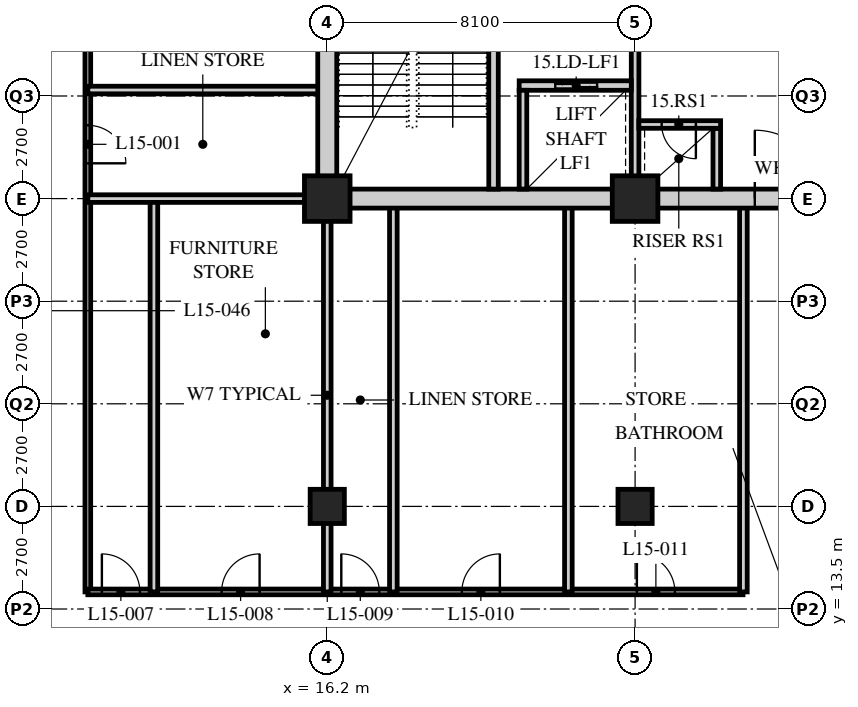
"""IFC4 building model, lengths in metres.
Left out: names, types, materials, properties, quantities, classifications, styles, units other than length and angle.
Written with IfcOpenShell. Run it as: python <this file> out.ifc"""

import sys

from ifc_helpers import new_model, si_unit, direction, frame, frame_2d, origin, origin_2d, place, context, subcontext, project, spatial, rectangle, hollow_rectangle, extrude, element, fill, save


model = new_model("IFC4")
c1 = context("Model", 3, precision=1e-05, world=origin(), true_north=direction((0.0, 1.0)))
c2 = subcontext(c1, "Body", "Model", "MODEL_VIEW")
j1 = project(units=[si_unit("LENGTHUNIT", "METRE"), si_unit("PLANEANGLEUNIT", "RADIAN")], contexts=[c1])
p1 = place(None, origin())
s1 = spatial("IfcSite", under=j1, at=p1, CompositionType="ELEMENT")
p2 = place(p1, origin())
s2 = spatial("IfcBuilding", under=s1, at=p2, CompositionType="ELEMENT")
p3 = place(p2, frame((0.0, 0.0, 63.6)))
s3 = spatial("IfcBuildingStorey", under=s2, at=p3, CompositionType="ELEMENT", Elevation=63.6)
p4 = place(p3, frame((16.2, 16.2, 0.0), z_axis=(0.0, 0.0, 1.0), x_axis=(1.0, 0.0, 0.0)))
e1 = element("IfcColumn", 1, at=p4, inside=s3, PredefinedType="COLUMN", context=c2, shape_type="SweptSolid", body=[
    extrude(hollow_rectangle(XDim=0.9, YDim=0.9, WallThickness=0.09, at=origin_2d()), origin(), (0.0, 0.0, 1.0), 3.4),
])
p5 = place(p3, frame((16.2, 24.3, 0.0), z_axis=(0.0, 0.0, 1.0), x_axis=(1.0, 0.0, 0.0)))
e2 = element("IfcColumn", 2, at=p5, inside=s3, PredefinedType="COLUMN", context=c2, shape_type="SweptSolid", body=[
    extrude(hollow_rectangle(XDim=1.2, YDim=1.2, WallThickness=0.12, at=origin_2d()), origin(), (0.0, 0.0, 1.0), 3.4),
])
p6 = place(p3, frame((24.3, 16.2, 0.0), z_axis=(0.0, 0.0, 1.0), x_axis=(1.0, 0.0, 0.0)))
e3 = element("IfcColumn", 3, at=p6, inside=s3, PredefinedType="COLUMN", context=c2, shape_type="SweptSolid", body=[
    extrude(hollow_rectangle(XDim=0.9, YDim=0.9, WallThickness=0.09, at=origin_2d()), origin(), (0.0, 0.0, 1.0), 3.4),
])
p7 = place(p3, frame((24.3, 24.3, 0.0), z_axis=(0.0, 0.0, 1.0), x_axis=(1.0, 0.0, 0.0)))
e4 = element("IfcColumn", 4, at=p7, inside=s3, PredefinedType="COLUMN", context=c2, shape_type="SweptSolid", body=[
    extrude(hollow_rectangle(XDim=1.2, YDim=1.2, WallThickness=0.12, at=origin_2d()), origin(), (0.0, 0.0, 1.0), 3.4),
])
p8 = place(p3, frame((9.9, 40.5, 0.0), z_axis=(0.0, 0.0, 1.0), x_axis=(0.0, -1.0, 0.0)))
e5 = element("IfcWall", 5, at=p8, inside=s3, PredefinedType="PARTITIONING", context=c2, shape_type="SweptSolid", body=[
    extrude(rectangle(XDim=26.55, YDim=0.15, at=frame_2d((13.275, 0.0))), origin(), (0.0, 0.0, 1.0), 3.19),
])
p9 = place(p8, frame((14.271, 0.0, 0.0)))
e6 = element("IfcOpeningElement", 6, at=p9, cuts=e5, PredefinedType="OPENING", context=c2, shape_type="SweptSolid", body=[
    extrude(rectangle(XDim=1.0, YDim=2.1, at=frame_2d((0.5, 1.05))), frame((0.0, 0.085, 0.0), z_axis=(0.0, -1.0, 0.0), x_axis=(1.0, 0.0, 0.0)), (0.0, 0.0, 1.0), 0.17),
])
p10 = place(p8, frame((10.221, 0.0, 0.0)))
e7 = element("IfcOpeningElement", 7, at=p10, cuts=e5, PredefinedType="OPENING", context=c2, shape_type="SweptSolid", body=[
    extrude(rectangle(XDim=1.0, YDim=2.1, at=frame_2d((0.5, 1.05))), frame((0.0, 0.085, 0.0), z_axis=(0.0, -1.0, 0.0), x_axis=(1.0, 0.0, 0.0)), (0.0, 0.0, 1.0), 0.17),
])
p11 = place(p8, frame((6.8, 0.0, 0.0)))
e8 = element("IfcOpeningElement", 8, at=p11, cuts=e5, PredefinedType="OPENING", context=c2, shape_type="SweptSolid", body=[
    extrude(rectangle(XDim=1.0, YDim=2.1, at=frame_2d((0.5, 1.05))), frame((0.0, 0.085, 0.0), z_axis=(0.0, -1.0, 0.0), x_axis=(1.0, 0.0, 0.0)), (0.0, 0.0, 1.0), 0.17),
])
p12 = place(p8, frame((2.75, 0.0, 0.0)))
e9 = element("IfcOpeningElement", 9, at=p12, cuts=e5, PredefinedType="OPENING", context=c2, shape_type="SweptSolid", body=[
    extrude(rectangle(XDim=1.0, YDim=2.1, at=frame_2d((0.5, 1.05))), frame((0.0, 0.085, 0.0), z_axis=(0.0, -1.0, 0.0), x_axis=(1.0, 0.0, 0.0)), (0.0, 0.0, 1.0), 0.17),
])
p13 = place(p3, frame((9.9, 13.95, 0.0), z_axis=(0.0, 0.0, 1.0), x_axis=(1.0, 0.0, 0.0)))
e10 = element("IfcWall", 10, at=p13, inside=s3, PredefinedType="PARTITIONING", context=c2, shape_type="SweptSolid", body=[
    extrude(rectangle(XDim=17.24, YDim=0.15, at=frame_2d((8.62, 0.0))), origin(), (0.0, 0.0, 1.0), 3.19),
])
p14 = place(p13, frame((0.37, 0.0, 0.0)))
e11 = element("IfcOpeningElement", 11, at=p14, cuts=e10, PredefinedType="OPENING", context=c2, shape_type="SweptSolid", body=[
    extrude(rectangle(XDim=1.0, YDim=2.1, at=frame_2d((0.5, 1.05))), frame((0.0, 0.085, 0.0), z_axis=(0.0, -1.0, 0.0), x_axis=(1.0, 0.0, 0.0)), (0.0, 0.0, 1.0), 0.17),
])
p15 = place(p13, frame((3.52, 0.0, 0.0)))
e12 = element("IfcOpeningElement", 12, at=p15, cuts=e10, PredefinedType="OPENING", context=c2, shape_type="SweptSolid", body=[
    extrude(rectangle(XDim=1.0, YDim=2.1, at=frame_2d((0.5, 1.05))), frame((0.0, 0.085, 0.0), z_axis=(0.0, -1.0, 0.0), x_axis=(1.0, 0.0, 0.0)), (0.0, 0.0, 1.0), 0.17),
])
p16 = place(p13, frame((6.67, 0.0, 0.0)))
e13 = element("IfcOpeningElement", 13, at=p16, cuts=e10, PredefinedType="OPENING", context=c2, shape_type="SweptSolid", body=[
    extrude(rectangle(XDim=1.0, YDim=2.1, at=frame_2d((0.5, 1.05))), frame((0.0, 0.085, 0.0), z_axis=(0.0, -1.0, 0.0), x_axis=(1.0, 0.0, 0.0)), (0.0, 0.0, 1.0), 0.17),
])
p17 = place(p13, frame((9.842, 0.0, 0.0)))
e14 = element("IfcOpeningElement", 14, at=p17, cuts=e10, PredefinedType="OPENING", context=c2, shape_type="SweptSolid", body=[
    extrude(rectangle(XDim=1.0, YDim=2.1, at=frame_2d((0.5, 1.05))), frame((0.0, 0.085, 0.0), z_axis=(0.0, -1.0, 0.0), x_axis=(1.0, 0.0, 0.0)), (0.0, 0.0, 1.0), 0.17),
])
p18 = place(p13, frame((14.447, 0.0, 0.0)))
e15 = element("IfcOpeningElement", 15, at=p18, cuts=e10, PredefinedType="OPENING", context=c2, shape_type="SweptSolid", body=[
    extrude(rectangle(XDim=1.0, YDim=2.1, at=frame_2d((0.5, 1.05))), frame((0.0, 0.085, 0.0), z_axis=(0.0, -1.0, 0.0), x_axis=(1.0, 0.0, 0.0)), (0.0, 0.0, 1.0), 0.17),
])
p19 = place(p3, frame((9.9, 27.157, 0.0), z_axis=(0.0, 0.0, 1.0), x_axis=(1.0, 0.0, 0.0)))
e16 = element("IfcWall", 16, at=p19, inside=s3, PredefinedType="SOLIDWALL", context=c2, shape_type="SweptSolid", body=[
    extrude(rectangle(XDim=6.3, YDim=0.2, at=frame_2d((3.15, 0.0))), origin(), (0.0, 0.0, 1.0), 3.19),
])
p20 = place(p3, frame((16.2, 13.95, 0.0), z_axis=(0.0, 0.0, 1.0), x_axis=(0.0, 1.0, 0.0)))
e17 = element("IfcWall", 17, at=p20, inside=s3, PredefinedType="SOLIDWALL", context=c2, shape_type="SweptSolid", body=[
    extrude(rectangle(XDim=10.35, YDim=0.2, at=frame_2d((5.175, 0.0))), origin(), (0.0, 0.0, 1.0), 2.578),
])
for number, where, z_axis, x_axis in (
    (18, (11.639, 13.95, 0.0), (0.0, 0.0, 1.0), (0.0, 1.0, 0.0)),
    (19, (17.939, 13.95, 0.0), (0.0, 0.0, 1.0), (0.0, 1.0, 0.0)),
    (20, (22.545, 13.95, 0.0), (0.0, 0.0, 1.0), (0.0, 1.0, 0.0)),
    (21, (27.15, 13.95, 0.0), (0.0, 0.0, 1.0), (0.0, 1.0, 0.0)),
):
    element("IfcWall", number, at=place(p3, frame(where, z_axis=z_axis, x_axis=x_axis)), inside=s3, PredefinedType="SOLIDWALL", context=c2, shape_type="SweptSolid", body=[
        extrude(rectangle(XDim=10.35, YDim=0.2, at=frame_2d((5.175, 0.0))), origin(), (0.0, 0.0, 1.0), 3.19),
    ])
p21 = place(p3, frame((9.9, 24.3, 0.0), z_axis=(0.0, 0.0, 1.0), x_axis=(1.0, 0.0, 0.0)))
e22 = element("IfcWall", 22, at=p21, inside=s3, PredefinedType="SOLIDWALL", context=c2, shape_type="SweptSolid", body=[
    extrude(rectangle(XDim=6.3, YDim=0.2, at=frame_2d((3.15, 0.0))), origin(), (0.0, 0.0, 1.0), 2.578),
])
p22 = place(p3, frame((15.95, 24.3, 0.0), z_axis=(0.0, 0.0, 1.0), x_axis=(1.0, 0.0, 0.0)))
e23 = element("IfcWall", 23, at=p22, inside=s3, PredefinedType="SOLIDWALL", context=c2, shape_type="SweptSolid", body=[
    extrude(rectangle(XDim=24.8, YDim=0.5, at=frame_2d((12.4, 0.0))), origin(), (0.0, 0.0, 1.0), 2.54),
])
p23 = place(p22, frame((11.5, 0.0, 0.0)))
e24 = element("IfcOpeningElement", 24, at=p23, cuts=e23, PredefinedType="OPENING", context=c2, shape_type="SweptSolid", body=[
    extrude(rectangle(XDim=1.8, YDim=2.4, at=frame_2d((0.9, 1.2))), frame((0.0, 0.26, 0.0), z_axis=(0.0, -1.0, 0.0), x_axis=(1.0, 0.0, 0.0)), (0.0, 0.0, 1.0), 0.52),
])
p24 = place(p3, frame((16.2, 24.55, 0.0), z_axis=(0.0, 0.0, 1.0), x_axis=(0.0, 1.0, 0.0)))
e25 = element("IfcWall", 25, at=p24, inside=s3, PredefinedType="SOLIDWALL", context=c2, shape_type="SweptSolid", body=[
    extrude(rectangle(XDim=15.7, YDim=0.5, at=frame_2d((7.85, 0.0))), origin(), (0.0, 0.0, 1.0), 2.578),
])
p25 = place(p3, frame((24.3, 24.55, 0.0), z_axis=(0.0, 0.0, 1.0), x_axis=(0.0, 1.0, 0.0)))
e26 = element("IfcWall", 26, at=p25, inside=s3, PredefinedType="SOLIDWALL", context=c2, shape_type="SweptSolid", body=[
    extrude(rectangle(XDim=7.75, YDim=0.2, at=frame_2d((3.875, 0.0))), origin(), (0.0, 0.0, 1.0), 2.578),
])
p26 = place(p25, frame((4.6, 0.0, 0.0)))
e27 = element("IfcOpeningElement", 27, at=p26, cuts=e26, PredefinedType="OPENING", context=c2, shape_type="SweptSolid", body=[
    extrude(rectangle(XDim=1.2, YDim=2.1, at=frame_2d((0.6, 1.05))), frame((0.0, 0.11, 0.0), z_axis=(0.0, -1.0, 0.0), x_axis=(1.0, 0.0, 0.0)), (0.0, 0.0, 1.0), 0.22),
])
p27 = place(p3, frame((20.575, 24.55, 0.0), z_axis=(0.0, 0.0, 1.0), x_axis=(0.0, 1.0, 0.0)))
e28 = element("IfcWall", 28, at=p27, inside=s3, PredefinedType="SOLIDWALL", context=c2, shape_type="SweptSolid", body=[
    extrude(rectangle(XDim=7.75, YDim=0.25, at=frame_2d((3.875, 0.0))), origin(), (0.0, 0.0, 1.0), 3.19),
])
p28 = place(p27, frame((6.2, 0.0, 0.0)))
e29 = element("IfcOpeningElement", 29, at=p28, cuts=e28, PredefinedType="OPENING", context=c2, shape_type="SweptSolid", body=[
    extrude(rectangle(XDim=1.2, YDim=2.1, at=frame_2d((0.6, 1.05))), frame((0.0, 0.135, 0.0), z_axis=(0.0, -1.0, 0.0), x_axis=(1.0, 0.0, 0.0)), (0.0, 0.0, 1.0), 0.27),
])
p29 = place(p3, frame((21.25, 27.275, 0.0), z_axis=(0.0, 0.0, 1.0), x_axis=(1.0, 0.0, 0.0)))
e30 = element("IfcWall", 30, at=p29, inside=s3, PredefinedType="SOLIDWALL", context=c2, shape_type="SweptSolid", body=[
    extrude(rectangle(XDim=2.95, YDim=0.25, at=frame_2d((1.475, 0.0))), origin(), (0.0, 0.0, 1.0), 3.19),
])
p30 = place(p29, frame((0.95, 0.0, 0.0)))
e31 = element("IfcOpeningElement", 31, at=p30, cuts=e30, PredefinedType="OPENING", context=c2, shape_type="SweptSolid", body=[
    extrude(rectangle(XDim=1.1, YDim=2.4, at=frame_2d((0.55, 1.2))), frame((0.0, 0.135, 0.0), z_axis=(0.0, -1.0, 0.0), x_axis=(1.0, 0.0, 0.0)), (0.0, 0.0, 1.0), 0.27),
])
p31 = place(p3, frame((21.35, 24.55, 0.0), z_axis=(0.0, 0.0, 1.0), x_axis=(0.0, 1.0, 0.0)))
e32 = element("IfcWall", 32, at=p31, inside=s3, PredefinedType="SOLIDWALL", context=c2, shape_type="SweptSolid", body=[
    extrude(rectangle(XDim=2.6, YDim=0.2, at=frame_2d((1.3, 0.0))), origin(), (0.0, 0.0, 1.0), 3.19),
])
p32 = place(p3, frame((26.45, 24.55, 0.0), z_axis=(0.0, 0.0, 1.0), x_axis=(0.0, 1.0, 0.0)))
e33 = element("IfcWall", 33, at=p32, inside=s3, PredefinedType="SOLIDWALL", context=c2, shape_type="SweptSolid", body=[
    extrude(rectangle(XDim=1.6, YDim=0.2, at=frame_2d((0.8, 0.0))), origin(), (0.0, 0.0, 1.0), 3.19),
])
p33 = place(p3, frame((24.4, 26.25, 0.0), z_axis=(0.0, 0.0, 1.0), x_axis=(1.0, 0.0, 0.0)))
e34 = element("IfcWall", 34, at=p33, inside=s3, PredefinedType="SOLIDWALL", context=c2, shape_type="SweptSolid", body=[
    extrude(rectangle(XDim=2.15, YDim=0.2, at=frame_2d((1.075, 0.0))), origin(), (0.0, 0.0, 1.0), 3.19),
])
p34 = place(p33, frame((0.6, 0.0, 0.0)))
e35 = element("IfcOpeningElement", 35, at=p34, cuts=e34, PredefinedType="OPENING", context=c2, shape_type="SweptSolid", body=[
    extrude(rectangle(XDim=0.9, YDim=2.1, at=frame_2d((0.45, 1.05))), frame((0.0, 0.11, 0.0), z_axis=(0.0, -1.0, 0.0), x_axis=(1.0, 0.0, 0.0)), (0.0, 0.0, 1.0), 0.22),
])
p35 = place(p9, origin())
e36 = element("IfcDoor", 36, at=p35, inside=s3, OperationType="SINGLE_SWING_RIGHT", PredefinedType="DOOR", context=c2, shape_type="SweptSolid", body=[
    extrude(rectangle(XDim=1.0, YDim=2.1, at=frame_2d((0.5, 1.05))), frame((0.0, 0.025, 0.0), z_axis=(0.0, -1.0, 0.0), x_axis=(1.0, 0.0, 0.0)), (0.0, 0.0, 1.0), 0.05),
])
fill(e6, e36)
p36 = place(p14, origin())
e37 = element("IfcDoor", 37, at=p36, inside=s3, OperationType="SINGLE_SWING_LEFT", PredefinedType="DOOR", context=c2, shape_type="SweptSolid", body=[
    extrude(rectangle(XDim=1.0, YDim=2.1, at=frame_2d((0.5, 1.05))), frame((0.0, 0.025, 0.0), z_axis=(0.0, -1.0, 0.0), x_axis=(1.0, 0.0, 0.0)), (0.0, 0.0, 1.0), 0.05),
])
fill(e11, e37)
p37 = place(p15, origin())
e38 = element("IfcDoor", 38, at=p37, inside=s3, OperationType="SINGLE_SWING_RIGHT", PredefinedType="DOOR", context=c2, shape_type="SweptSolid", body=[
    extrude(rectangle(XDim=1.0, YDim=2.1, at=frame_2d((0.5, 1.05))), frame((0.0, 0.025, 0.0), z_axis=(0.0, -1.0, 0.0), x_axis=(1.0, 0.0, 0.0)), (0.0, 0.0, 1.0), 0.05),
])
fill(e12, e38)
p38 = place(p16, origin())
e39 = element("IfcDoor", 39, at=p38, inside=s3, OperationType="SINGLE_SWING_LEFT", PredefinedType="DOOR", context=c2, shape_type="SweptSolid", body=[
    extrude(rectangle(XDim=1.0, YDim=2.1, at=frame_2d((0.5, 1.05))), frame((0.0, 0.025, 0.0), z_axis=(0.0, -1.0, 0.0), x_axis=(1.0, 0.0, 0.0)), (0.0, 0.0, 1.0), 0.05),
])
fill(e13, e39)
p39 = place(p17, origin())
e40 = element("IfcDoor", 40, at=p39, inside=s3, OperationType="SINGLE_SWING_RIGHT", PredefinedType="DOOR", context=c2, shape_type="SweptSolid", body=[
    extrude(rectangle(XDim=1.0, YDim=2.1, at=frame_2d((0.5, 1.05))), frame((0.0, 0.025, 0.0), z_axis=(0.0, -1.0, 0.0), x_axis=(1.0, 0.0, 0.0)), (0.0, 0.0, 1.0), 0.05),
])
fill(e14, e40)
p40 = place(p18, origin())
e41 = element("IfcDoor", 41, at=p40, inside=s3, OperationType="SINGLE_SWING_LEFT", PredefinedType="DOOR", context=c2, shape_type="SweptSolid", body=[
    extrude(rectangle(XDim=1.0, YDim=2.1, at=frame_2d((0.5, 1.05))), frame((0.0, 0.025, 0.0), z_axis=(0.0, -1.0, 0.0), x_axis=(1.0, 0.0, 0.0)), (0.0, 0.0, 1.0), 0.05),
])
fill(e15, e41)
p41 = place(p34, origin())
e42 = element("IfcDoor", 42, at=p41, inside=s3, OperationType="SINGLE_SWING_LEFT", PredefinedType="DOOR", context=c2, shape_type="SweptSolid", body=[
    extrude(rectangle(XDim=0.9, YDim=2.1, at=frame_2d((0.45, 1.05))), frame((0.0, 0.025, 0.0), z_axis=(0.0, -1.0, 0.0), x_axis=(1.0, 0.0, 0.0)), (0.0, 0.0, 1.0), 0.05),
])
fill(e35, e42)
p42 = place(p30, origin())
e43 = element("IfcDoor", 43, at=p42, inside=s3, OperationType="DOUBLE_DOOR_SLIDING", PredefinedType="DOOR", context=c2, shape_type="SweptSolid", body=[
    extrude(rectangle(XDim=1.1, YDim=2.4, at=frame_2d((0.55, 1.2))), frame((0.0, 0.025, 0.0), z_axis=(0.0, -1.0, 0.0), x_axis=(1.0, 0.0, 0.0)), (0.0, 0.0, 1.0), 0.05),
])
fill(e31, e43)
p43 = place(p23, origin())
e44 = element("IfcDoor", 44, at=p43, inside=s3, OperationType="DOUBLE_DOOR_SINGLE_SWING", PredefinedType="DOOR", context=c2, shape_type="SweptSolid", body=[
    extrude(rectangle(XDim=1.8, YDim=2.4, at=frame_2d((0.9, 1.2))), frame((0.0, 0.025, 0.0), z_axis=(0.0, -1.0, 0.0), x_axis=(1.0, 0.0, 0.0)), (0.0, 0.0, 1.0), 0.05),
])
fill(e24, e44)
save(model, sys.argv[1])
